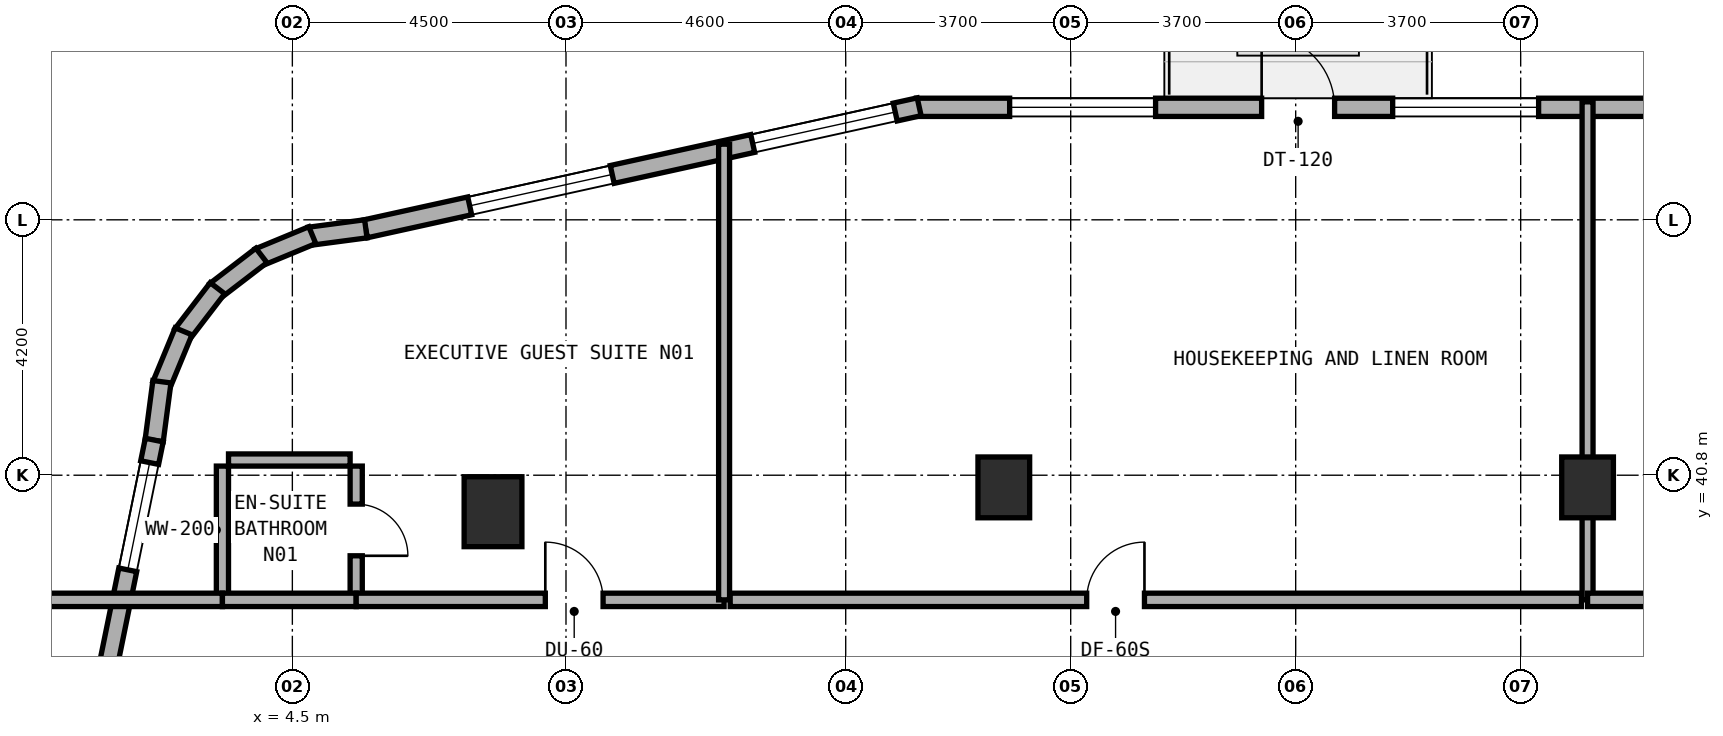
"""IFC4 building model, lengths in metres.
Left out: names, types, materials, properties, quantities, classifications, styles, units other than length and angle.
Written with IfcOpenShell. Run it as: python <this file> out.ifc"""

import sys

from ifc_helpers import new_model, si_unit, direction, frame, frame_2d, origin, origin_2d, place, context, subcontext, project, spatial, rectangle, extrude, element, fill, save


model = new_model("IFC4")
c1 = context("Model", 3, precision=1e-05, world=origin(), true_north=direction((0.0, 1.0)))
c2 = subcontext(c1, "Body", "Model", "MODEL_VIEW")
j1 = project(units=[si_unit("LENGTHUNIT", "METRE"), si_unit("PLANEANGLEUNIT", "RADIAN")], contexts=[c1])
p1 = place(None, origin())
s1 = spatial("IfcSite", under=j1, at=p1, CompositionType="ELEMENT")
p2 = place(p1, origin())
s2 = spatial("IfcBuilding", under=s1, at=p2, CompositionType="ELEMENT")
p3 = place(p2, frame((0.0, 0.0, 80.0)))
s3 = spatial("IfcBuildingStorey", under=s2, at=p3, CompositionType="ELEMENT", Elevation=80.0)
for number, where, z_axis, x_axis in (
    (1, (16.2, 40.6, 0.0), (0.0, 0.0, 1.0), (1.0, 0.0, 0.0)),
    (2, (25.8, 40.6, 0.0), (0.0, 0.0, 1.0), (1.0, 0.0, 0.0)),
):
    element("IfcColumn", number, at=place(p3, frame(where, z_axis=z_axis, x_axis=x_axis)), inside=s3, PredefinedType="COLUMN", context=c2, shape_type="SweptSolid", body=[
        extrude(rectangle(XDim=0.85, YDim=1.0, at=origin_2d()), origin(), (0.0, 0.0, 1.0), 3.5),
    ])
p4 = place(p3, frame((7.8, 40.2, 0.0), z_axis=(0.0, 0.0, 1.0), x_axis=(1.0, 0.0, 0.0)))
e3 = element("IfcColumn", 3, at=p4, inside=s3, PredefinedType="COLUMN", context=c2, shape_type="SweptSolid", body=[
    extrude(rectangle(XDim=0.95, YDim=1.15, at=origin_2d()), origin(), (0.0, 0.0, 1.0), 3.5),
])
p5 = place(p3, frame((27.353, 46.85, 0.0), z_axis=(0.0, 0.0, 1.0), x_axis=(-1.0, 0.0, 0.0)))
e4 = element("IfcWall", 4, at=p5, inside=s3, PredefinedType="STANDARD", context=c2, shape_type="SweptSolid", body=[
    extrude(rectangle(XDim=12.591, YDim=0.3, at=frame_2d((6.295, 0.0))), origin(), (0.0, 0.0, 1.0), 3.22),
])
p6 = place(p5, frame((5.713, 0.0, 0.0)))
e5 = element("IfcOpeningElement", 5, at=p6, cuts=e4, PredefinedType="OPENING", context=c2, shape_type="SweptSolid", body=[
    extrude(rectangle(XDim=1.2, YDim=2.15, at=frame_2d((0.6, 1.075))), frame((0.0, 0.16, 0.0), z_axis=(0.0, -1.0, 0.0), x_axis=(1.0, 0.0, 0.0)), (0.0, 0.0, 1.0), 0.32),
])
p7 = place(p5, frame((2.358, 0.0, 0.8)))
e6 = element("IfcOpeningElement", 6, at=p7, cuts=e4, PredefinedType="OPENING", context=c2, shape_type="SweptSolid", body=[
    extrude(rectangle(XDim=2.4, YDim=1.6, at=frame_2d((1.2, 0.8))), frame((0.0, 0.16, 0.0), z_axis=(0.0, -1.0, 0.0), x_axis=(1.0, 0.0, 0.0)), (0.0, 0.0, 1.0), 0.32),
])
p8 = place(p5, frame((8.657, 0.0, 0.8)))
e7 = element("IfcOpeningElement", 7, at=p8, cuts=e4, PredefinedType="OPENING", context=c2, shape_type="SweptSolid", body=[
    extrude(rectangle(XDim=2.4, YDim=1.6, at=frame_2d((1.2, 0.8))), frame((0.0, 0.16, 0.0), z_axis=(0.0, -1.0, 0.0), x_axis=(1.0, 0.0, 0.0)), (0.0, 0.0, 1.0), 0.32),
])
p9 = place(p3, frame((14.808, 46.859, 0.0), z_axis=(0.0, 0.0, 1.0), x_axis=(-0.976555357219, -0.21526642629, 0.0)))
e8 = element("IfcWall", 8, at=p9, inside=s3, PredefinedType="STANDARD", context=c2, shape_type="SweptSolid", body=[
    extrude(rectangle(XDim=9.323, YDim=0.3, at=frame_2d((4.661, 0.0))), origin(), (0.0, 0.0, 1.0), 3.22),
])
p10 = place(p9, frame((0.403, 0.0, 0.8)))
e9 = element("IfcOpeningElement", 9, at=p10, cuts=e8, PredefinedType="OPENING", context=c2, shape_type="SweptSolid", body=[
    extrude(rectangle(XDim=2.4, YDim=1.6, at=frame_2d((1.2, 0.8))), frame((0.0, 0.16, 0.0), z_axis=(0.0, -1.0, 0.0), x_axis=(1.0, 0.0, 0.0)), (0.0, 0.0, 1.0), 0.32),
])
p11 = place(p9, frame((5.169, 0.0, 0.8)))
e10 = element("IfcOpeningElement", 10, at=p11, cuts=e8, PredefinedType="OPENING", context=c2, shape_type="SweptSolid", body=[
    extrude(rectangle(XDim=2.4, YDim=1.6, at=frame_2d((1.2, 0.8))), frame((0.0, 0.16, 0.0), z_axis=(0.0, -1.0, 0.0), x_axis=(1.0, 0.0, 0.0)), (0.0, 0.0, 1.0), 0.32),
])
p12 = place(p3, frame((5.708, 44.852, 0.0), z_axis=(0.0, 0.0, 1.0), x_axis=(-0.991359246108, -0.131174864804, 0.0)))
e11 = element("IfcWall", 11, at=p12, inside=s3, PredefinedType="STANDARD", context=c2, shape_type="SweptSolid", body=[
    extrude(rectangle(XDim=0.938, YDim=0.3, at=frame_2d((0.469, 0.0))), origin(), (0.0, 0.0, 1.0), 3.22),
])
p13 = place(p3, frame((4.828, 44.748, 0.0), z_axis=(0.0, 0.0, 1.0), x_axis=(-0.923982547689, -0.382434636986, 0.0)))
e12 = element("IfcWall", 12, at=p13, inside=s3, PredefinedType="STANDARD", context=c2, shape_type="SweptSolid", body=[
    extrude(rectangle(XDim=0.954, YDim=0.3, at=frame_2d((0.477, 0.0))), origin(), (0.0, 0.0, 1.0), 3.22),
])
for number, where, z_axis, x_axis in (
    (13, (3.991, 44.414, 0.0), (0.0, 0.0, 1.0), (-0.794, -0.608, 0.0)),
    (14, (3.268, 43.875, 0.0), (0.0, 0.0, 1.0), (-0.608, -0.794, 0.0)),
):
    element("IfcWall", number, at=place(p3, frame(where, z_axis=z_axis, x_axis=x_axis)), inside=s3, PredefinedType="STANDARD", context=c2, shape_type="SweptSolid", body=[
        extrude(rectangle(XDim=0.955, YDim=0.3, at=frame_2d((0.478, 0.0))), origin(), (0.0, 0.0, 1.0), 3.22),
    ])
p14 = place(p3, frame((2.711, 43.166, 0.0), z_axis=(0.0, 0.0, 1.0), x_axis=(-0.382344263057, -0.924019948111, 0.0)))
e15 = element("IfcWall", 15, at=p14, inside=s3, PredefinedType="STANDARD", context=c2, shape_type="SweptSolid", body=[
    extrude(rectangle(XDim=0.955, YDim=0.3, at=frame_2d((0.477, 0.0))), origin(), (0.0, 0.0, 1.0), 3.22),
])
p15 = place(p3, frame((2.355, 42.337, 0.0), z_axis=(0.0, 0.0, 1.0), x_axis=(-0.130454512571, -0.991454295543, 0.0)))
e16 = element("IfcWall", 16, at=p15, inside=s3, PredefinedType="STANDARD", context=c2, shape_type="SweptSolid", body=[
    extrude(rectangle(XDim=0.973, YDim=0.3, at=frame_2d((0.487, 0.0))), origin(), (0.0, 0.0, 1.0), 3.22),
])
p16 = place(p3, frame((2.229, 41.378, 0.0), z_axis=(0.0, 0.0, 1.0), x_axis=(-0.199990901713, -0.979797754249, 0.0)))
e17 = element("IfcWall", 17, at=p16, inside=s3, PredefinedType="STANDARD", context=c2, shape_type="SweptSolid", body=[
    extrude(rectangle(XDim=10.065, YDim=0.3, at=frame_2d((5.033, 0.0))), origin(), (0.0, 0.0, 1.0), 3.22),
])
p17 = place(p16, frame((0.378, 0.0, 0.85)))
e18 = element("IfcOpeningElement", 18, at=p17, cuts=e17, PredefinedType="OPENING", context=c2, shape_type="SweptSolid", body=[
    extrude(rectangle(XDim=1.8, YDim=1.5, at=frame_2d((0.9, 0.75))), frame((0.0, 0.16, 0.0), z_axis=(0.0, -1.0, 0.0), x_axis=(1.0, 0.0, 0.0)), (0.0, 0.0, 1.0), 0.32),
])
p18 = place(p16, frame((5.236, 0.0, 0.8)))
e19 = element("IfcOpeningElement", 19, at=p18, cuts=e17, PredefinedType="OPENING", context=c2, shape_type="SweptSolid", body=[
    extrude(rectangle(XDim=2.4, YDim=1.6, at=frame_2d((1.2, 0.8))), frame((0.0, 0.16, 0.0), z_axis=(0.0, -1.0, 0.0), x_axis=(1.0, 0.0, 0.0)), (0.0, 0.0, 1.0), 0.32),
])
p19 = place(p3, frame((5.55, 38.85, 0.0), z_axis=(0.0, 0.0, 1.0), x_axis=(0.0, 1.0, 0.0)))
e20 = element("IfcWall", 20, at=p19, inside=s3, PredefinedType="PLUMBINGWALL", context=c2, shape_type="SweptSolid", body=[
    extrude(rectangle(XDim=2.1, YDim=0.2, at=frame_2d((1.05, 0.0))), origin(), (0.0, 0.0, 1.0), 3.22),
])
p20 = place(p19, frame((0.625, 0.0, 0.0)))
e21 = element("IfcOpeningElement", 21, at=p20, cuts=e20, PredefinedType="OPENING", context=c2, shape_type="SweptSolid", body=[
    extrude(rectangle(XDim=0.85, YDim=2.1, at=frame_2d((0.425, 1.05))), frame((0.0, 0.11, 0.0), z_axis=(0.0, -1.0, 0.0), x_axis=(1.0, 0.0, 0.0)), (0.0, 0.0, 1.0), 0.22),
])
p21 = place(p3, frame((3.45, 41.05, 0.0), z_axis=(0.0, 0.0, 1.0), x_axis=(1.0, 0.0, 0.0)))
e22 = element("IfcWall", 22, at=p21, inside=s3, PredefinedType="PLUMBINGWALL", context=c2, shape_type="SweptSolid", body=[
    extrude(rectangle(XDim=2.0, YDim=0.2, at=frame_2d((1.0, 0.0))), origin(), (0.0, 0.0, 1.0), 3.22),
])
p22 = place(p3, frame((3.35, 38.85, 0.0), z_axis=(0.0, 0.0, 1.0), x_axis=(0.0, 1.0, 0.0)))
e23 = element("IfcWall", 23, at=p22, inside=s3, PredefinedType="PLUMBINGWALL", context=c2, shape_type="SweptSolid", body=[
    extrude(rectangle(XDim=2.1, YDim=0.2, at=frame_2d((1.05, 0.0))), origin(), (0.0, 0.0, 1.0), 3.22),
])
p23 = place(p3, frame((0.24, 38.75, 0.0), z_axis=(0.0, 0.0, 1.0), x_axis=(1.0, 0.0, 0.0)))
e24 = element("IfcWall", 24, at=p23, inside=s3, PredefinedType="SOLIDWALL", context=c2, shape_type="SweptSolid", body=[
    extrude(rectangle(XDim=3.11, YDim=0.22, at=frame_2d((1.555, 0.0))), origin(), (0.0, 0.0, 1.0), 3.22),
])
p24 = place(p3, frame((3.35, 38.75, 0.0), z_axis=(0.0, 0.0, 1.0), x_axis=(1.0, 0.0, 0.0)))
e25 = element("IfcWall", 25, at=p24, inside=s3, PredefinedType="SOLIDWALL", context=c2, shape_type="SweptSolid", body=[
    extrude(rectangle(XDim=2.2, YDim=0.22, at=frame_2d((1.1, 0.0))), origin(), (0.0, 0.0, 1.0), 3.22),
])
p25 = place(p3, frame((5.55, 38.75, 0.0), z_axis=(0.0, 0.0, 1.0), x_axis=(1.0, 0.0, 0.0)))
e26 = element("IfcWall", 26, at=p25, inside=s3, PredefinedType="SOLIDWALL", context=c2, shape_type="SweptSolid", body=[
    extrude(rectangle(XDim=6.05, YDim=0.22, at=frame_2d((3.025, 0.0))), origin(), (0.0, 0.0, 1.0), 2.495),
])
p26 = place(p25, frame((3.11, 0.0, 0.0)))
e27 = element("IfcOpeningElement", 27, at=p26, cuts=e26, PredefinedType="OPENING", context=c2, shape_type="SweptSolid", body=[
    extrude(rectangle(XDim=0.95, YDim=2.1, at=frame_2d((0.475, 1.05))), frame((0.0, 0.12, 0.0), z_axis=(0.0, -1.0, 0.0), x_axis=(1.0, 0.0, 0.0)), (0.0, 0.0, 1.0), 0.24),
])
p27 = place(p3, frame((11.6, 38.75, 0.0), z_axis=(0.0, 0.0, 1.0), x_axis=(0.0, 1.0, 0.0)))
e28 = element("IfcWall", 28, at=p27, inside=s3, PredefinedType="SOLIDWALL", context=c2, shape_type="SweptSolid", body=[
    extrude(rectangle(XDim=7.494, YDim=0.18, at=frame_2d((3.747, 0.0))), origin(), (0.0, 0.0, 1.0), 2.745),
])
p28 = place(p3, frame((11.7, 38.75, 0.0), z_axis=(0.0, 0.0, 1.0), x_axis=(1.0, 0.0, 0.0)))
e29 = element("IfcWall", 29, at=p28, inside=s3, PredefinedType="SOLIDWALL", context=c2, shape_type="SweptSolid", body=[
    extrude(rectangle(XDim=14.0, YDim=0.22, at=frame_2d((7.0, 0.0))), origin(), (0.0, 0.0, 1.0), 2.495),
])
p29 = place(p28, frame((5.863, 0.0, 0.0)))
e30 = element("IfcOpeningElement", 30, at=p29, cuts=e29, PredefinedType="OPENING", context=c2, shape_type="SweptSolid", body=[
    extrude(rectangle(XDim=0.95, YDim=2.1, at=frame_2d((0.475, 1.05))), frame((0.0, 0.12, 0.0), z_axis=(0.0, -1.0, 0.0), x_axis=(1.0, 0.0, 0.0)), (0.0, 0.0, 1.0), 0.24),
])
p30 = place(p3, frame((25.8, 38.75, 0.0), z_axis=(0.0, 0.0, 1.0), x_axis=(0.0, 1.0, 0.0)))
e31 = element("IfcWall", 31, at=p30, inside=s3, PredefinedType="SOLIDWALL", context=c2, shape_type="SweptSolid", body=[
    extrude(rectangle(XDim=8.19, YDim=0.18, at=frame_2d((4.095, 0.0))), origin(), (0.0, 0.0, 1.0), 2.495),
])
p31 = place(p3, frame((25.8, 38.75, 0.0), z_axis=(0.0, 0.0, 1.0), x_axis=(1.0, 0.0, 0.0)))
e32 = element("IfcWall", 32, at=p31, inside=s3, PredefinedType="SOLIDWALL", context=c2, shape_type="SweptSolid", body=[
    extrude(rectangle(XDim=10.65, YDim=0.22, at=frame_2d((5.325, 0.0))), origin(), (0.0, 0.0, 1.0), 2.495),
])
p32 = place(p31, frame((4.85, 0.0, 0.0)))
e33 = element("IfcOpeningElement", 33, at=p32, cuts=e32, PredefinedType="OPENING", context=c2, shape_type="SweptSolid", body=[
    extrude(rectangle(XDim=0.95, YDim=2.1, at=frame_2d((0.475, 1.05))), frame((0.0, 0.12, 0.0), z_axis=(0.0, -1.0, 0.0), x_axis=(1.0, 0.0, 0.0)), (0.0, 0.0, 1.0), 0.24),
])
p33 = place(p6, frame((1.2, 0.0, 0.0), z_axis=(0.0, 0.0, 1.0), x_axis=(-1.0, 0.0, 0.0)))
e34 = element("IfcDoor", 34, at=p33, inside=s3, OperationType="SINGLE_SWING_LEFT", PredefinedType="DOOR", context=c2, shape_type="SweptSolid", body=[
    extrude(rectangle(XDim=1.2, YDim=2.15, at=frame_2d((0.6, 1.075))), frame((0.0, 0.025, 0.0), z_axis=(0.0, -1.0, 0.0), x_axis=(1.0, 0.0, 0.0)), (0.0, 0.0, 1.0), 0.05),
])
fill(e5, e34)
p34 = place(p7, origin())
e35 = element("IfcWindow", 35, at=p34, inside=s3, PartitioningType="SINGLE_PANEL", PredefinedType="WINDOW", context=c2, shape_type="SweptSolid", body=[
    extrude(rectangle(XDim=2.4, YDim=1.6, at=frame_2d((1.2, 0.8))), frame((0.0, 0.03, 0.0), z_axis=(0.0, -1.0, 0.0), x_axis=(1.0, 0.0, 0.0)), (0.0, 0.0, 1.0), 0.06),
])
fill(e6, e35)
p35 = place(p8, origin())
e36 = element("IfcWindow", 36, at=p35, inside=s3, PartitioningType="SINGLE_PANEL", PredefinedType="WINDOW", context=c2, shape_type="SweptSolid", body=[
    extrude(rectangle(XDim=2.4, YDim=1.6, at=frame_2d((1.2, 0.8))), frame((0.0, 0.03, 0.0), z_axis=(0.0, -1.0, 0.0), x_axis=(1.0, 0.0, 0.0)), (0.0, 0.0, 1.0), 0.06),
])
fill(e7, e36)
p36 = place(p10, origin())
e37 = element("IfcWindow", 37, at=p36, inside=s3, PartitioningType="SINGLE_PANEL", PredefinedType="WINDOW", context=c2, shape_type="SweptSolid", body=[
    extrude(rectangle(XDim=2.4, YDim=1.6, at=frame_2d((1.2, 0.8))), frame((0.0, 0.03, 0.0), z_axis=(0.0, -1.0, 0.0), x_axis=(1.0, 0.0, 0.0)), (0.0, 0.0, 1.0), 0.06),
])
fill(e9, e37)
p37 = place(p11, origin())
e38 = element("IfcWindow", 38, at=p37, inside=s3, PartitioningType="SINGLE_PANEL", PredefinedType="WINDOW", context=c2, shape_type="SweptSolid", body=[
    extrude(rectangle(XDim=2.4, YDim=1.6, at=frame_2d((1.2, 0.8))), frame((0.0, 0.03, 0.0), z_axis=(0.0, -1.0, 0.0), x_axis=(1.0, 0.0, 0.0)), (0.0, 0.0, 1.0), 0.06),
])
fill(e10, e38)
p38 = place(p17, origin())
e39 = element("IfcWindow", 39, at=p38, inside=s3, PartitioningType="SINGLE_PANEL", PredefinedType="WINDOW", context=c2, shape_type="SweptSolid", body=[
    extrude(rectangle(XDim=1.8, YDim=1.5, at=frame_2d((0.9, 0.75))), frame((0.0, 0.03, 0.0), z_axis=(0.0, -1.0, 0.0), x_axis=(1.0, 0.0, 0.0)), (0.0, 0.0, 1.0), 0.06),
])
fill(e18, e39)
p39 = place(p20, frame((0.85, 0.0, 0.0), z_axis=(0.0, 0.0, 1.0), x_axis=(-1.0, 0.0, 0.0)))
e40 = element("IfcDoor", 40, at=p39, inside=s3, OperationType="SINGLE_SWING_RIGHT", PredefinedType="DOOR", context=c2, shape_type="SweptSolid", body=[
    extrude(rectangle(XDim=0.85, YDim=2.1, at=frame_2d((0.425, 1.05))), frame((0.0, 0.025, 0.0), z_axis=(0.0, -1.0, 0.0), x_axis=(1.0, 0.0, 0.0)), (0.0, 0.0, 1.0), 0.05),
])
fill(e21, e40)
p40 = place(p26, origin())
e41 = element("IfcDoor", 41, at=p40, inside=s3, OperationType="SINGLE_SWING_LEFT", PredefinedType="DOOR", context=c2, shape_type="SweptSolid", body=[
    extrude(rectangle(XDim=0.95, YDim=2.1, at=frame_2d((0.475, 1.05))), frame((0.0, 0.025, 0.0), z_axis=(0.0, -1.0, 0.0), x_axis=(1.0, 0.0, 0.0)), (0.0, 0.0, 1.0), 0.05),
])
fill(e27, e41)
p41 = place(p29, origin())
e42 = element("IfcDoor", 42, at=p41, inside=s3, OperationType="SINGLE_SWING_RIGHT", PredefinedType="DOOR", context=c2, shape_type="SweptSolid", body=[
    extrude(rectangle(XDim=0.95, YDim=2.1, at=frame_2d((0.475, 1.05))), frame((0.0, 0.025, 0.0), z_axis=(0.0, -1.0, 0.0), x_axis=(1.0, 0.0, 0.0)), (0.0, 0.0, 1.0), 0.05),
])
fill(e30, e42)
save(model, sys.argv[1])
